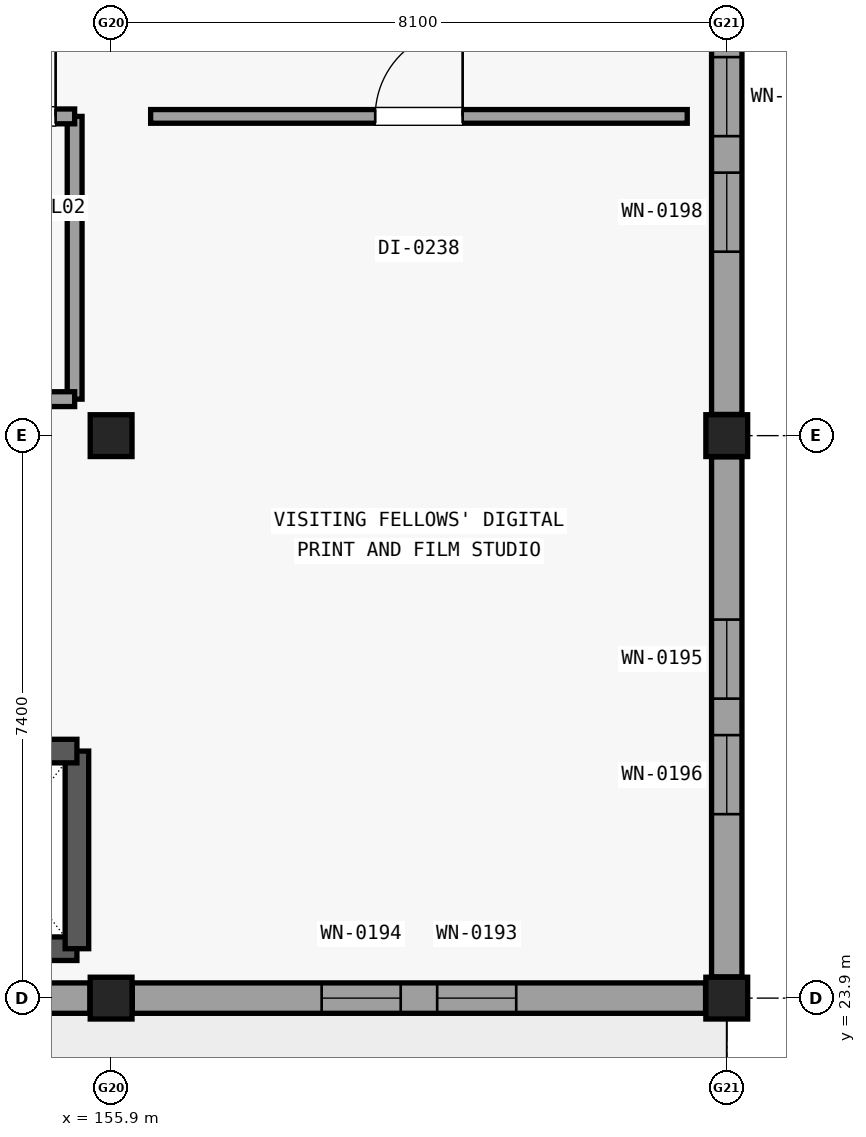
"""IFC4 building model, lengths in metres.
Left out: names, types, materials, properties, quantities, classifications, styles, units other than length and angle.
Written with IfcOpenShell. Run it as: python <this file> out.ifc"""

import sys

from ifc_helpers import new_model, si_unit, direction, frame, frame_2d, origin, origin_2d, place, context, subcontext, project, spatial, rectangle, extrude, element, fill, save


model = new_model("IFC4")
c1 = context("Model", 3, precision=1e-05, world=origin(), true_north=direction((0.0, 1.0)))
c2 = subcontext(c1, "Body", "Model", "MODEL_VIEW")
j1 = project(units=[si_unit("LENGTHUNIT", "METRE"), si_unit("PLANEANGLEUNIT", "RADIAN")], contexts=[c1])
p1 = place(None, origin())
s1 = spatial("IfcSite", under=j1, at=p1, CompositionType="ELEMENT")
p2 = place(p1, origin())
s2 = spatial("IfcBuilding", under=s1, at=p2, CompositionType="ELEMENT")
p3 = place(p2, frame((0.0, 0.0, 10.2)))
s3 = spatial("IfcBuildingStorey", under=s2, at=p3, CompositionType="ELEMENT", Elevation=10.2)
for number, where, z_axis, x_axis in (
    (1, (155.9, 23.9, 0.0), (0.0, 0.0, 1.0), (1.0, 0.0, 0.0)),
    (2, (155.9, 31.3, 0.0), (0.0, 0.0, 1.0), (1.0, 0.0, 0.0)),
    (3, (164.0, 23.9, 0.0), (0.0, 0.0, 1.0), (1.0, 0.0, 0.0)),
    (4, (164.0, 31.3, 0.0), (0.0, 0.0, 1.0), (1.0, 0.0, 0.0)),
):
    element("IfcColumn", number, at=place(p3, frame(where, z_axis=z_axis, x_axis=x_axis)), inside=s3, PredefinedType="COLUMN", context=c2, shape_type="SweptSolid", body=[
        extrude(rectangle(XDim=0.55, YDim=0.55, at=origin_2d()), origin(), (0.0, 0.0, 1.0), 3.37),
    ])
p4 = place(p3, frame((155.621, 23.9, 0.0), z_axis=(0.0, 0.0, 1.0), x_axis=(-1.0, 0.0, 0.0)))
e5 = element("IfcWall", 5, at=p4, inside=s3, PredefinedType="SOLIDWALL", context=c2, shape_type="SweptSolid", body=[
    extrude(rectangle(XDim=7.542, YDim=0.4, at=frame_2d((3.771, 0.0))), origin(), (0.0, 0.0, 1.0), 2.898),
])
p5 = place(p4, frame((2.491, 0.0, 0.6)))
e6 = element("IfcOpeningElement", 6, at=p5, cuts=e5, PredefinedType="OPENING", context=c2, shape_type="SweptSolid", body=[
    extrude(rectangle(XDim=1.04, YDim=2.06, at=frame_2d((0.52, 1.03))), frame((0.0, 0.21, 0.0), z_axis=(0.0, -1.0, 0.0), x_axis=(1.0, 0.0, 0.0)), (0.0, 0.0, 1.0), 0.42),
])
p6 = place(p4, frame((4.011, 0.0, 0.6)))
e7 = element("IfcOpeningElement", 7, at=p6, cuts=e5, PredefinedType="OPENING", context=c2, shape_type="SweptSolid", body=[
    extrude(rectangle(XDim=1.04, YDim=2.06, at=frame_2d((0.52, 1.03))), frame((0.0, 0.21, 0.0), z_axis=(0.0, -1.0, 0.0), x_axis=(1.0, 0.0, 0.0)), (0.0, 0.0, 1.0), 0.42),
])
p7 = place(p3, frame((163.721, 23.9, 0.0), z_axis=(0.0, 0.0, 1.0), x_axis=(-1.0, 0.0, 0.0)))
e8 = element("IfcWall", 8, at=p7, inside=s3, PredefinedType="SOLIDWALL", context=c2, shape_type="SweptSolid", body=[
    extrude(rectangle(XDim=7.542, YDim=0.4, at=frame_2d((3.771, 0.0))), origin(), (0.0, 0.0, 1.0), 2.898),
])
p8 = place(p7, frame((2.491, 0.0, 0.6)))
e9 = element("IfcOpeningElement", 9, at=p8, cuts=e8, PredefinedType="OPENING", context=c2, shape_type="SweptSolid", body=[
    extrude(rectangle(XDim=1.04, YDim=2.06, at=frame_2d((0.52, 1.03))), frame((0.0, 0.21, 0.0), z_axis=(0.0, -1.0, 0.0), x_axis=(1.0, 0.0, 0.0)), (0.0, 0.0, 1.0), 0.42),
])
p9 = place(p7, frame((4.011, 0.0, 0.6)))
e10 = element("IfcOpeningElement", 10, at=p9, cuts=e8, PredefinedType="OPENING", context=c2, shape_type="SweptSolid", body=[
    extrude(rectangle(XDim=1.04, YDim=2.06, at=frame_2d((0.52, 1.03))), frame((0.0, 0.21, 0.0), z_axis=(0.0, -1.0, 0.0), x_axis=(1.0, 0.0, 0.0)), (0.0, 0.0, 1.0), 0.42),
])
p10 = place(p3, frame((164.0, 31.021, 0.0), z_axis=(0.0, 0.0, 1.0), x_axis=(0.0, -1.0, 0.0)))
e11 = element("IfcWall", 11, at=p10, inside=s3, PredefinedType="SOLIDWALL", context=c2, shape_type="SweptSolid", body=[
    extrude(rectangle(XDim=6.842, YDim=0.4, at=frame_2d((3.421, 0.0))), origin(), (0.0, 0.0, 1.0), 2.898),
])
p11 = place(p10, frame((2.141, 0.0, 0.6)))
e12 = element("IfcOpeningElement", 12, at=p11, cuts=e11, PredefinedType="OPENING", context=c2, shape_type="SweptSolid", body=[
    extrude(rectangle(XDim=1.04, YDim=2.06, at=frame_2d((0.52, 1.03))), frame((0.0, 0.21, 0.0), z_axis=(0.0, -1.0, 0.0), x_axis=(1.0, 0.0, 0.0)), (0.0, 0.0, 1.0), 0.42),
])
p12 = place(p10, frame((3.661, 0.0, 0.6)))
e13 = element("IfcOpeningElement", 13, at=p12, cuts=e11, PredefinedType="OPENING", context=c2, shape_type="SweptSolid", body=[
    extrude(rectangle(XDim=1.04, YDim=2.06, at=frame_2d((0.52, 1.03))), frame((0.0, 0.21, 0.0), z_axis=(0.0, -1.0, 0.0), x_axis=(1.0, 0.0, 0.0)), (0.0, 0.0, 1.0), 0.42),
])
p13 = place(p3, frame((164.0, 38.421, 0.0), z_axis=(0.0, 0.0, 1.0), x_axis=(0.0, -1.0, 0.0)))
e14 = element("IfcWall", 14, at=p13, inside=s3, PredefinedType="SOLIDWALL", context=c2, shape_type="SweptSolid", body=[
    extrude(rectangle(XDim=6.842, YDim=0.4, at=frame_2d((3.421, 0.0))), origin(), (0.0, 0.0, 1.0), 2.898),
])
p14 = place(p13, frame((2.141, 0.0, 0.6)))
e15 = element("IfcOpeningElement", 15, at=p14, cuts=e14, PredefinedType="OPENING", context=c2, shape_type="SweptSolid", body=[
    extrude(rectangle(XDim=1.04, YDim=2.06, at=frame_2d((0.52, 1.03))), frame((0.0, 0.21, 0.0), z_axis=(0.0, -1.0, 0.0), x_axis=(1.0, 0.0, 0.0)), (0.0, 0.0, 1.0), 0.42),
])
p15 = place(p13, frame((3.661, 0.0, 0.6)))
e16 = element("IfcOpeningElement", 16, at=p15, cuts=e14, PredefinedType="OPENING", context=c2, shape_type="SweptSolid", body=[
    extrude(rectangle(XDim=1.04, YDim=2.06, at=frame_2d((0.52, 1.03))), frame((0.0, 0.21, 0.0), z_axis=(0.0, -1.0, 0.0), x_axis=(1.0, 0.0, 0.0)), (0.0, 0.0, 1.0), 0.42),
])
p16 = place(p3, frame((153.35, 24.55, 0.0), z_axis=(0.0, 0.0, 1.0), x_axis=(1.0, 0.0, 0.0)))
e17 = element("IfcWall", 17, at=p16, inside=s3, PredefinedType="SHEAR", context=c2, shape_type="SweptSolid", body=[
    extrude(rectangle(XDim=2.1, YDim=0.31, at=frame_2d((1.05, 0.0))), origin(), (0.0, 0.0, 1.0), 3.365),
])
p17 = place(p3, frame((155.45, 24.55, 0.0), z_axis=(0.0, 0.0, 1.0), x_axis=(0.0, 1.0, 0.0)))
e18 = element("IfcWall", 18, at=p17, inside=s3, PredefinedType="SHEAR", context=c2, shape_type="SweptSolid", body=[
    extrude(rectangle(XDim=2.6, YDim=0.31, at=frame_2d((1.3, 0.0))), origin(), (0.0, 0.0, 1.0), 3.365),
])
p18 = place(p3, frame((153.35, 27.15, 0.0), z_axis=(0.0, 0.0, 1.0), x_axis=(1.0, 0.0, 0.0)))
e19 = element("IfcWall", 19, at=p18, inside=s3, PredefinedType="SHEAR", context=c2, shape_type="SweptSolid", body=[
    extrude(rectangle(XDim=2.1, YDim=0.31, at=frame_2d((1.05, 0.0))), origin(), (0.0, 0.0, 1.0), 3.365),
])
p19 = place(p18, frame((0.5, 0.0, 0.0)))
e20 = element("IfcOpeningElement", 20, at=p19, cuts=e19, PredefinedType="OPENING", context=c2, shape_type="SweptSolid", body=[
    extrude(rectangle(XDim=1.1, YDim=2.15, at=frame_2d((0.55, 1.075))), frame((0.0, 0.165, 0.0), z_axis=(0.0, -1.0, 0.0), x_axis=(1.0, 0.0, 0.0)), (0.0, 0.0, 1.0), 0.33),
])
p20 = place(p3, frame((155.42, 31.78, 0.0), z_axis=(0.0, 0.0, 1.0), x_axis=(0.0, 1.0, 0.0)))
e21 = element("IfcWall", 21, at=p20, inside=s3, PredefinedType="PARTITIONING", context=c2, shape_type="SweptSolid", body=[
    extrude(rectangle(XDim=3.72, YDim=0.195, at=frame_2d((1.86, 0.0))), origin(), (0.0, 0.0, 1.0), 2.903),
])
p21 = place(p3, frame((152.45, 31.78, 0.0), z_axis=(0.0, 0.0, 1.0), x_axis=(1.0, 0.0, 0.0)))
e22 = element("IfcWall", 22, at=p21, inside=s3, PredefinedType="PARTITIONING", context=c2, shape_type="SweptSolid", body=[
    extrude(rectangle(XDim=2.97, YDim=0.195, at=frame_2d((1.485, 0.0))), origin(), (0.0, 0.0, 1.0), 2.903),
])
p22 = place(p3, frame((152.45, 35.5, 0.0), z_axis=(0.0, 0.0, 1.0), x_axis=(1.0, 0.0, 0.0)))
e23 = element("IfcWall", 23, at=p22, inside=s3, PredefinedType="PARTITIONING", context=c2, shape_type="SweptSolid", body=[
    extrude(rectangle(XDim=2.97, YDim=0.195, at=frame_2d((1.485, 0.0))), origin(), (0.0, 0.0, 1.0), 2.903),
])
p23 = place(p22, frame((0.25, 0.0, 0.0)))
e24 = element("IfcOpeningElement", 24, at=p23, cuts=e23, PredefinedType="OPENING", context=c2, shape_type="SweptSolid", body=[
    extrude(rectangle(XDim=0.95, YDim=2.1, at=frame_2d((0.475, 1.05))), frame((0.0, 0.107, 0.0), z_axis=(0.0, -1.0, 0.0), x_axis=(1.0, 0.0, 0.0)), (0.0, 0.0, 1.0), 0.215),
])
p24 = place(p22, frame((1.82, 0.0, 0.0)))
e25 = element("IfcOpeningElement", 25, at=p24, cuts=e23, PredefinedType="OPENING", context=c2, shape_type="SweptSolid", body=[
    extrude(rectangle(XDim=0.9, YDim=2.1, at=frame_2d((0.45, 1.05))), frame((0.0, 0.107, 0.0), z_axis=(0.0, -1.0, 0.0), x_axis=(1.0, 0.0, 0.0)), (0.0, 0.0, 1.0), 0.215),
])
p25 = place(p3, frame((156.42, 35.5, 0.0), z_axis=(0.0, 0.0, 1.0), x_axis=(1.0, 0.0, 0.0)))
e26 = element("IfcWall", 26, at=p25, inside=s3, PredefinedType="PARTITIONING", context=c2, shape_type="SweptSolid", body=[
    extrude(rectangle(XDim=7.06, YDim=0.18, at=frame_2d((3.53, 0.0))), origin(), (0.0, 0.0, 1.0), 2.903),
])
p26 = place(p25, frame((2.955, 0.0, 0.0)))
e27 = element("IfcOpeningElement", 27, at=p26, cuts=e26, PredefinedType="OPENING", context=c2, shape_type="SweptSolid", body=[
    extrude(rectangle(XDim=1.15, YDim=2.15, at=frame_2d((0.575, 1.075))), frame((0.0, 0.1, 0.0), z_axis=(0.0, -1.0, 0.0), x_axis=(1.0, 0.0, 0.0)), (0.0, 0.0, 1.0), 0.2),
])
p27 = place(p8, origin())
e28 = element("IfcWindow", 28, at=p27, inside=s3, PartitioningType="SINGLE_PANEL", PredefinedType="WINDOW", context=c2, shape_type="SweptSolid", body=[
    extrude(rectangle(XDim=1.04, YDim=2.06, at=frame_2d((0.52, 1.03))), frame((0.0, 0.03, 0.0), z_axis=(0.0, -1.0, 0.0), x_axis=(1.0, 0.0, 0.0)), (0.0, 0.0, 1.0), 0.06),
])
fill(e9, e28)
p28 = place(p9, origin())
e29 = element("IfcWindow", 29, at=p28, inside=s3, PartitioningType="SINGLE_PANEL", PredefinedType="WINDOW", context=c2, shape_type="SweptSolid", body=[
    extrude(rectangle(XDim=1.04, YDim=2.06, at=frame_2d((0.52, 1.03))), frame((0.0, 0.03, 0.0), z_axis=(0.0, -1.0, 0.0), x_axis=(1.0, 0.0, 0.0)), (0.0, 0.0, 1.0), 0.06),
])
fill(e10, e29)
p29 = place(p11, origin())
e30 = element("IfcWindow", 30, at=p29, inside=s3, PartitioningType="SINGLE_PANEL", PredefinedType="WINDOW", context=c2, shape_type="SweptSolid", body=[
    extrude(rectangle(XDim=1.04, YDim=2.06, at=frame_2d((0.52, 1.03))), frame((0.0, 0.03, 0.0), z_axis=(0.0, -1.0, 0.0), x_axis=(1.0, 0.0, 0.0)), (0.0, 0.0, 1.0), 0.06),
])
fill(e12, e30)
p30 = place(p12, origin())
e31 = element("IfcWindow", 31, at=p30, inside=s3, PartitioningType="SINGLE_PANEL", PredefinedType="WINDOW", context=c2, shape_type="SweptSolid", body=[
    extrude(rectangle(XDim=1.04, YDim=2.06, at=frame_2d((0.52, 1.03))), frame((0.0, 0.03, 0.0), z_axis=(0.0, -1.0, 0.0), x_axis=(1.0, 0.0, 0.0)), (0.0, 0.0, 1.0), 0.06),
])
fill(e13, e31)
p31 = place(p14, origin())
e32 = element("IfcWindow", 32, at=p31, inside=s3, PartitioningType="SINGLE_PANEL", PredefinedType="WINDOW", context=c2, shape_type="SweptSolid", body=[
    extrude(rectangle(XDim=1.04, YDim=2.06, at=frame_2d((0.52, 1.03))), frame((0.0, 0.03, 0.0), z_axis=(0.0, -1.0, 0.0), x_axis=(1.0, 0.0, 0.0)), (0.0, 0.0, 1.0), 0.06),
])
fill(e15, e32)
p32 = place(p15, origin())
e33 = element("IfcWindow", 33, at=p32, inside=s3, PartitioningType="SINGLE_PANEL", PredefinedType="WINDOW", context=c2, shape_type="SweptSolid", body=[
    extrude(rectangle(XDim=1.04, YDim=2.06, at=frame_2d((0.52, 1.03))), frame((0.0, 0.03, 0.0), z_axis=(0.0, -1.0, 0.0), x_axis=(1.0, 0.0, 0.0)), (0.0, 0.0, 1.0), 0.06),
])
fill(e16, e33)
p33 = place(p24, origin())
e34 = element("IfcDoor", 34, at=p33, inside=s3, OperationType="SINGLE_SWING_RIGHT", PredefinedType="DOOR", context=c2, shape_type="SweptSolid", body=[
    extrude(rectangle(XDim=0.9, YDim=2.1, at=frame_2d((0.45, 1.05))), frame((0.0, 0.025, 0.0), z_axis=(0.0, -1.0, 0.0), x_axis=(1.0, 0.0, 0.0)), (0.0, 0.0, 1.0), 0.05),
])
fill(e25, e34)
p34 = place(p26, origin())
e35 = element("IfcDoor", 35, at=p34, inside=s3, OperationType="SINGLE_SWING_RIGHT", PredefinedType="DOOR", context=c2, shape_type="SweptSolid", body=[
    extrude(rectangle(XDim=1.15, YDim=2.15, at=frame_2d((0.575, 1.075))), frame((0.0, 0.025, 0.0), z_axis=(0.0, -1.0, 0.0), x_axis=(1.0, 0.0, 0.0)), (0.0, 0.0, 1.0), 0.05),
])
fill(e27, e35)
save(model, sys.argv[1])
